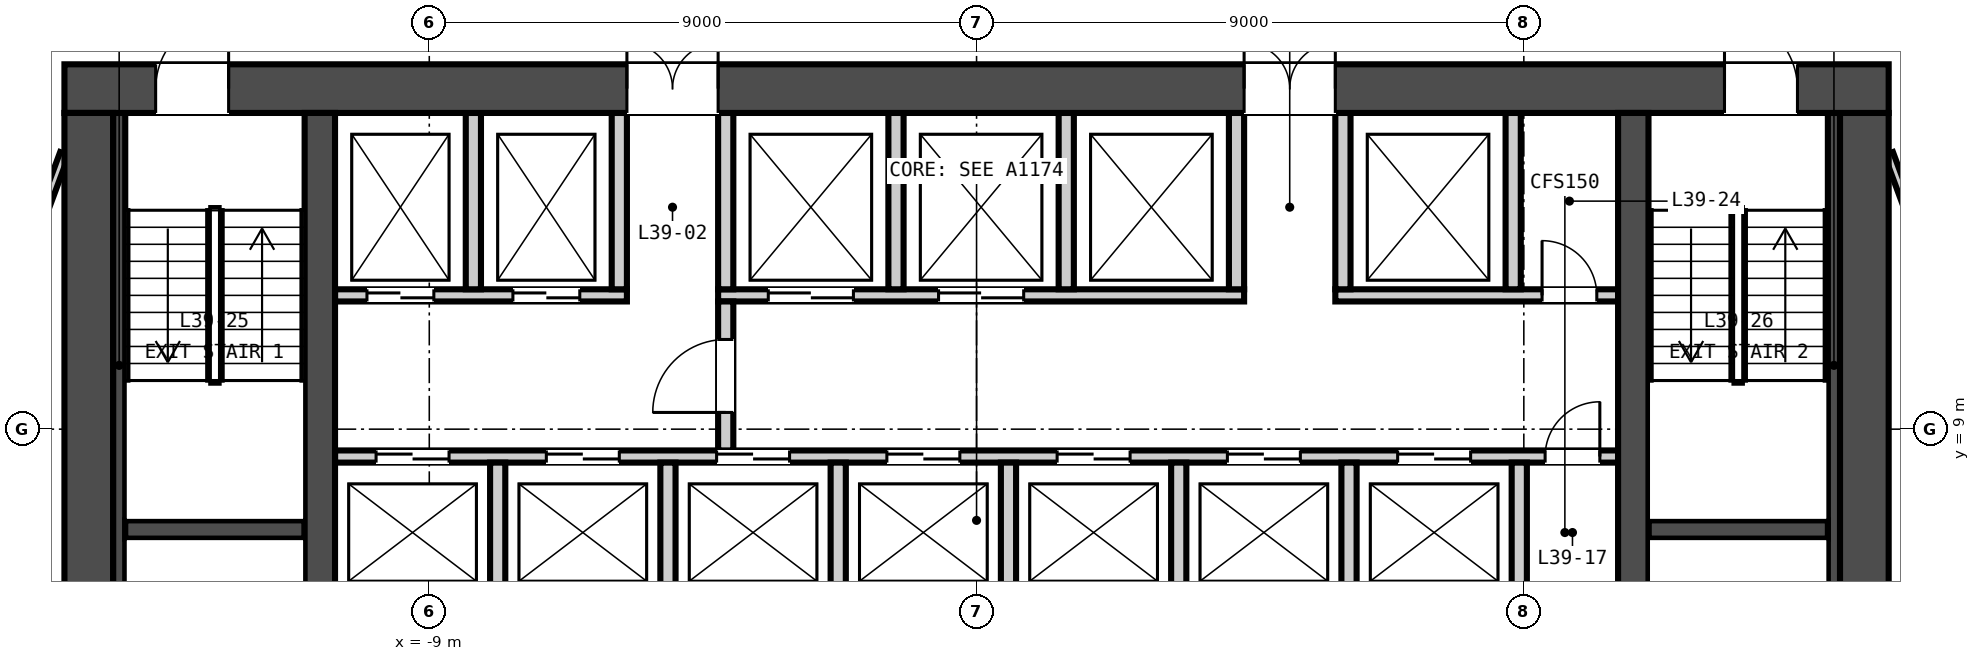
"""IFC4 building model, lengths in metres.
Left out: names, types, materials, properties, quantities, classifications, styles, units other than length and angle.
Written with IfcOpenShell. Run it as: python <this file> out.ifc"""

import sys

from ifc_helpers import new_model, si_unit, direction, frame, frame_2d, origin, place, context, subcontext, project, spatial, rectangle, extrude, element, fill, save


model = new_model("IFC4")
c1 = context("Model", 3, precision=1e-05, world=origin(), true_north=direction((0.0, 1.0)))
c2 = subcontext(c1, "Body", "Model", "MODEL_VIEW")
j1 = project(units=[si_unit("LENGTHUNIT", "METRE"), si_unit("PLANEANGLEUNIT", "RADIAN")], contexts=[c1])
p1 = place(None, origin())
s1 = spatial("IfcSite", under=j1, at=p1, CompositionType="ELEMENT")
p2 = place(p1, origin())
s2 = spatial("IfcBuilding", under=s1, at=p2, CompositionType="ELEMENT")
p3 = place(p2, frame((0.0, 0.0, 159.0)))
s3 = spatial("IfcBuildingStorey", under=s2, at=p3, CompositionType="ELEMENT", Elevation=159.0)
p4 = place(p3, frame((-15.0, 14.6, -0.15), z_axis=(0.0, 0.0, 1.0), x_axis=(1.0, 0.0, 0.0)))
e1 = element("IfcWall", 1, at=p4, inside=s3, PredefinedType="SOLIDWALL", context=c2, shape_type="SweptSolid", body=[
    extrude(rectangle(XDim=30.0, YDim=0.8, at=frame_2d((15.0, 0.0))), origin(), (0.0, 0.0, 1.0), 3.65),
])
p5 = place(p4, frame((9.25, 0.0, 0.15)))
e2 = element("IfcOpeningElement", 2, at=p5, cuts=e1, PredefinedType="OPENING", context=c2, shape_type="SweptSolid", body=[
    extrude(rectangle(XDim=1.5, YDim=2.1, at=frame_2d((0.75, 1.05))), frame((0.0, 0.41, 0.0), z_axis=(0.0, -1.0, 0.0), x_axis=(1.0, 0.0, 0.0)), (0.0, 0.0, 1.0), 0.82),
])
p6 = place(p4, frame((19.4, 0.0, 0.15)))
e3 = element("IfcOpeningElement", 3, at=p6, cuts=e1, PredefinedType="OPENING", context=c2, shape_type="SweptSolid", body=[
    extrude(rectangle(XDim=1.5, YDim=2.1, at=frame_2d((0.75, 1.05))), frame((0.0, 0.41, 0.0), z_axis=(0.0, -1.0, 0.0), x_axis=(1.0, 0.0, 0.0)), (0.0, 0.0, 1.0), 0.82),
])
p7 = place(p4, frame((1.5, 0.0, 0.15)))
e4 = element("IfcOpeningElement", 4, at=p7, cuts=e1, PredefinedType="OPENING", context=c2, shape_type="SweptSolid", body=[
    extrude(rectangle(XDim=1.2, YDim=2.1, at=frame_2d((0.6, 1.05))), frame((0.0, 0.41, 0.0), z_axis=(0.0, -1.0, 0.0), x_axis=(1.0, 0.0, 0.0)), (0.0, 0.0, 1.0), 0.82),
])
p8 = place(p4, frame((27.3, 0.0, 0.15)))
e5 = element("IfcOpeningElement", 5, at=p8, cuts=e1, PredefinedType="OPENING", context=c2, shape_type="SweptSolid", body=[
    extrude(rectangle(XDim=1.2, YDim=2.1, at=frame_2d((0.6, 1.05))), frame((0.0, 0.41, 0.0), z_axis=(0.0, -1.0, 0.0), x_axis=(1.0, 0.0, 0.0)), (0.0, 0.0, 1.0), 0.82),
])
for number, where, z_axis, x_axis in (
    (6, (-14.6, 0.8, -0.15), (0.0, 0.0, 1.0), (0.0, 1.0, 0.0)),
    (7, (14.6, 0.8, -0.15), (0.0, 0.0, 1.0), (0.0, 1.0, 0.0)),
):
    element("IfcWall", number, at=place(p3, frame(where, z_axis=z_axis, x_axis=x_axis)), inside=s3, PredefinedType="SOLIDWALL", context=c2, shape_type="SweptSolid", body=[
        extrude(rectangle(XDim=13.4, YDim=0.8, at=frame_2d((6.7, 0.0))), origin(), (0.0, 0.0, 1.0), 3.65),
    ])
for number, where, z_axis, x_axis in (
    (8, (-10.8, 0.8, -0.15), (0.0, 0.0, 1.0), (0.0, 1.0, 0.0)),
    (9, (10.8, 0.8, -0.15), (0.0, 0.0, 1.0), (0.0, 1.0, 0.0)),
):
    element("IfcWall", number, at=place(p3, frame(where, z_axis=z_axis, x_axis=x_axis)), inside=s3, PredefinedType="SOLIDWALL", context=c2, shape_type="SweptSolid", body=[
        extrude(rectangle(XDim=13.4, YDim=0.5, at=frame_2d((6.7, 0.0))), origin(), (0.0, 0.0, 1.0), 3.65),
    ])
p9 = place(p3, frame((-10.55, 8.55, 0.0), z_axis=(0.0, 0.0, 1.0), x_axis=(1.0, 0.0, 0.0)))
e10 = element("IfcWall", 10, at=p9, inside=s3, PredefinedType="PARTITIONING", context=c2, shape_type="SweptSolid", body=[
    extrude(rectangle(XDim=21.1, YDim=0.2, at=frame_2d((10.55, 0.0))), origin(), (0.0, 0.0, 1.0), 3.5),
])
p10 = place(p9, frame((0.675, 0.0, 0.0)))
e11 = element("IfcOpeningElement", 11, at=p10, cuts=e10, PredefinedType="OPENING", context=c2, shape_type="SweptSolid", body=[
    extrude(rectangle(XDim=1.2, YDim=2.1, at=frame_2d((0.6, 1.05))), frame((0.0, 0.11, 0.0), z_axis=(0.0, -1.0, 0.0), x_axis=(1.0, 0.0, 0.0)), (0.0, 0.0, 1.0), 0.22),
])
p11 = place(p9, frame((3.475, 0.0, 0.0)))
e12 = element("IfcOpeningElement", 12, at=p11, cuts=e10, PredefinedType="OPENING", context=c2, shape_type="SweptSolid", body=[
    extrude(rectangle(XDim=1.2, YDim=2.1, at=frame_2d((0.6, 1.05))), frame((0.0, 0.11, 0.0), z_axis=(0.0, -1.0, 0.0), x_axis=(1.0, 0.0, 0.0)), (0.0, 0.0, 1.0), 0.22),
])
p12 = place(p9, frame((6.275, 0.0, 0.0)))
e13 = element("IfcOpeningElement", 13, at=p12, cuts=e10, PredefinedType="OPENING", context=c2, shape_type="SweptSolid", body=[
    extrude(rectangle(XDim=1.2, YDim=2.1, at=frame_2d((0.6, 1.05))), frame((0.0, 0.11, 0.0), z_axis=(0.0, -1.0, 0.0), x_axis=(1.0, 0.0, 0.0)), (0.0, 0.0, 1.0), 0.22),
])
p13 = place(p9, frame((9.075, 0.0, 0.0)))
e14 = element("IfcOpeningElement", 14, at=p13, cuts=e10, PredefinedType="OPENING", context=c2, shape_type="SweptSolid", body=[
    extrude(rectangle(XDim=1.2, YDim=2.1, at=frame_2d((0.6, 1.05))), frame((0.0, 0.11, 0.0), z_axis=(0.0, -1.0, 0.0), x_axis=(1.0, 0.0, 0.0)), (0.0, 0.0, 1.0), 0.22),
])
p14 = place(p9, frame((11.875, 0.0, 0.0)))
e15 = element("IfcOpeningElement", 15, at=p14, cuts=e10, PredefinedType="OPENING", context=c2, shape_type="SweptSolid", body=[
    extrude(rectangle(XDim=1.2, YDim=2.1, at=frame_2d((0.6, 1.05))), frame((0.0, 0.11, 0.0), z_axis=(0.0, -1.0, 0.0), x_axis=(1.0, 0.0, 0.0)), (0.0, 0.0, 1.0), 0.22),
])
p15 = place(p9, frame((14.675, 0.0, 0.0)))
e16 = element("IfcOpeningElement", 16, at=p15, cuts=e10, PredefinedType="OPENING", context=c2, shape_type="SweptSolid", body=[
    extrude(rectangle(XDim=1.2, YDim=2.1, at=frame_2d((0.6, 1.05))), frame((0.0, 0.11, 0.0), z_axis=(0.0, -1.0, 0.0), x_axis=(1.0, 0.0, 0.0)), (0.0, 0.0, 1.0), 0.22),
])
p16 = place(p9, frame((17.475, 0.0, 0.0)))
e17 = element("IfcOpeningElement", 17, at=p16, cuts=e10, PredefinedType="OPENING", context=c2, shape_type="SweptSolid", body=[
    extrude(rectangle(XDim=1.2, YDim=2.1, at=frame_2d((0.6, 1.05))), frame((0.0, 0.11, 0.0), z_axis=(0.0, -1.0, 0.0), x_axis=(1.0, 0.0, 0.0)), (0.0, 0.0, 1.0), 0.22),
])
p17 = place(p9, frame((19.9, 0.0, 0.0)))
e18 = element("IfcOpeningElement", 18, at=p17, cuts=e10, PredefinedType="OPENING", context=c2, shape_type="SweptSolid", body=[
    extrude(rectangle(XDim=0.9, YDim=2.1, at=frame_2d((0.45, 1.05))), frame((0.0, 0.11, 0.0), z_axis=(0.0, -1.0, 0.0), x_axis=(1.0, 0.0, 0.0)), (0.0, 0.0, 1.0), 0.22),
])
p18 = place(p3, frame((-10.55, 11.2, 0.0), z_axis=(0.0, 0.0, 1.0), x_axis=(1.0, 0.0, 0.0)))
e19 = element("IfcWall", 19, at=p18, inside=s3, PredefinedType="PARTITIONING", context=c2, shape_type="SweptSolid", body=[
    extrude(rectangle(XDim=4.8, YDim=0.2, at=frame_2d((2.4, 0.0))), origin(), (0.0, 0.0, 1.0), 3.5),
])
p19 = place(p18, frame((0.525, 0.0, 0.0)))
e20 = element("IfcOpeningElement", 20, at=p19, cuts=e19, PredefinedType="OPENING", context=c2, shape_type="SweptSolid", body=[
    extrude(rectangle(XDim=1.1, YDim=2.1, at=frame_2d((0.55, 1.05))), frame((0.0, 0.11, 0.0), z_axis=(0.0, -1.0, 0.0), x_axis=(1.0, 0.0, 0.0)), (0.0, 0.0, 1.0), 0.22),
])
p20 = place(p18, frame((2.925, 0.0, 0.0)))
e21 = element("IfcOpeningElement", 21, at=p20, cuts=e19, PredefinedType="OPENING", context=c2, shape_type="SweptSolid", body=[
    extrude(rectangle(XDim=1.1, YDim=2.1, at=frame_2d((0.55, 1.05))), frame((0.0, 0.11, 0.0), z_axis=(0.0, -1.0, 0.0), x_axis=(1.0, 0.0, 0.0)), (0.0, 0.0, 1.0), 0.22),
])
p21 = place(p3, frame((-4.25, 11.2, 0.0), z_axis=(0.0, 0.0, 1.0), x_axis=(1.0, 0.0, 0.0)))
e22 = element("IfcWall", 22, at=p21, inside=s3, PredefinedType="PARTITIONING", context=c2, shape_type="SweptSolid", body=[
    extrude(rectangle(XDim=8.65, YDim=0.2, at=frame_2d((4.325, 0.0))), origin(), (0.0, 0.0, 1.0), 3.5),
])
p22 = place(p21, frame((0.825, 0.0, 0.0)))
e23 = element("IfcOpeningElement", 23, at=p22, cuts=e22, PredefinedType="OPENING", context=c2, shape_type="SweptSolid", body=[
    extrude(rectangle(XDim=1.4, YDim=2.1, at=frame_2d((0.7, 1.05))), frame((0.0, 0.11, 0.0), z_axis=(0.0, -1.0, 0.0), x_axis=(1.0, 0.0, 0.0)), (0.0, 0.0, 1.0), 0.22),
])
p23 = place(p21, frame((3.625, 0.0, 0.0)))
e24 = element("IfcOpeningElement", 24, at=p23, cuts=e22, PredefinedType="OPENING", context=c2, shape_type="SweptSolid", body=[
    extrude(rectangle(XDim=1.4, YDim=2.1, at=frame_2d((0.7, 1.05))), frame((0.0, 0.11, 0.0), z_axis=(0.0, -1.0, 0.0), x_axis=(1.0, 0.0, 0.0)), (0.0, 0.0, 1.0), 0.22),
])
p24 = place(p3, frame((5.9, 11.2, 0.0), z_axis=(0.0, 0.0, 1.0), x_axis=(1.0, 0.0, 0.0)))
e25 = element("IfcWall", 25, at=p24, inside=s3, PredefinedType="PARTITIONING", context=c2, shape_type="SweptSolid", body=[
    extrude(rectangle(XDim=4.65, YDim=0.2, at=frame_2d((2.325, 0.0))), origin(), (0.0, 0.0, 1.0), 3.5),
])
p25 = place(p24, frame((3.4, 0.0, 0.0)))
e26 = element("IfcOpeningElement", 26, at=p25, cuts=e25, PredefinedType="OPENING", context=c2, shape_type="SweptSolid", body=[
    extrude(rectangle(XDim=0.9, YDim=2.1, at=frame_2d((0.45, 1.05))), frame((0.0, 0.11, 0.0), z_axis=(0.0, -1.0, 0.0), x_axis=(1.0, 0.0, 0.0)), (0.0, 0.0, 1.0), 0.22),
])
p26 = place(p3, frame((-4.125, 8.65, 0.0), z_axis=(0.0, 0.0, 1.0), x_axis=(0.0, 1.0, 0.0)))
e27 = element("IfcWall", 27, at=p26, inside=s3, PredefinedType="PARTITIONING", context=c2, shape_type="SweptSolid", body=[
    extrude(rectangle(XDim=2.45, YDim=0.25, at=frame_2d((1.225, 0.0))), origin(), (0.0, 0.0, 1.0), 3.5),
])
p27 = place(p26, frame((0.625, 0.0, 0.0)))
e28 = element("IfcOpeningElement", 28, at=p27, cuts=e27, PredefinedType="OPENING", context=c2, shape_type="SweptSolid", body=[
    extrude(rectangle(XDim=1.2, YDim=2.1, at=frame_2d((0.6, 1.05))), frame((0.0, 0.135, 0.0), z_axis=(0.0, -1.0, 0.0), x_axis=(1.0, 0.0, 0.0)), (0.0, 0.0, 1.0), 0.27),
])
for number, where, z_axis, x_axis in (
    (29, (-7.875, 6.15, 0.0), (0.0, 0.0, 1.0), (0.0, 1.0, 0.0)),
    (30, (-5.075, 6.15, 0.0), (0.0, 0.0, 1.0), (0.0, 1.0, 0.0)),
    (31, (-2.275, 6.15, 0.0), (0.0, 0.0, 1.0), (0.0, 1.0, 0.0)),
    (32, (0.525, 6.15, 0.0), (0.0, 0.0, 1.0), (0.0, 1.0, 0.0)),
    (33, (3.325, 6.15, 0.0), (0.0, 0.0, 1.0), (0.0, 1.0, 0.0)),
    (34, (6.125, 6.15, 0.0), (0.0, 0.0, 1.0), (0.0, 1.0, 0.0)),
    (35, (8.925, 6.15, 0.0), (0.0, 0.0, 1.0), (0.0, 1.0, 0.0)),
):
    element("IfcWall", number, at=place(p3, frame(where, z_axis=z_axis, x_axis=x_axis)), inside=s3, PredefinedType="PARTITIONING", context=c2, shape_type="SweptSolid", body=[
        extrude(rectangle(XDim=2.3, YDim=0.25, at=frame_2d((1.15, 0.0))), origin(), (0.0, 0.0, 1.0), 3.5),
    ])
for number, where, z_axis, x_axis in (
    (36, (-8.275, 11.3, 0.0), (0.0, 0.0, 1.0), (0.0, 1.0, 0.0)),
    (37, (-5.875, 11.3, 0.0), (0.0, 0.0, 1.0), (0.0, 1.0, 0.0)),
    (38, (-4.125, 11.3, 0.0), (0.0, 0.0, 1.0), (0.0, 1.0, 0.0)),
    (39, (-1.325, 11.3, 0.0), (0.0, 0.0, 1.0), (0.0, 1.0, 0.0)),
    (40, (1.475, 11.3, 0.0), (0.0, 0.0, 1.0), (0.0, 1.0, 0.0)),
    (41, (4.275, 11.3, 0.0), (0.0, 0.0, 1.0), (0.0, 1.0, 0.0)),
    (42, (6.025, 11.3, 0.0), (0.0, 0.0, 1.0), (0.0, 1.0, 0.0)),
    (43, (8.825, 11.3, 0.0), (0.0, 0.0, 1.0), (0.0, 1.0, 0.0)),
):
    element("IfcWall", number, at=place(p3, frame(where, z_axis=z_axis, x_axis=x_axis)), inside=s3, PredefinedType="PARTITIONING", context=c2, shape_type="SweptSolid", body=[
        extrude(rectangle(XDim=2.9, YDim=0.25, at=frame_2d((1.45, 0.0))), origin(), (0.0, 0.0, 1.0), 3.5),
    ])
p28 = place(p3, frame((-14.0, 7.35, 0.0), z_axis=(0.0, 0.0, 1.0), x_axis=(1.0, 0.0, 0.0)))
e44 = element("IfcWall", 44, at=p28, inside=s3, PredefinedType="SOLIDWALL", context=c2, shape_type="SweptSolid", body=[
    extrude(rectangle(XDim=2.95, YDim=0.3, at=frame_2d((1.475, 0.0))), origin(), (0.0, 0.0, 1.0), 3.5),
])
p29 = place(p3, frame((-14.1, 0.8, 0.0), z_axis=(0.0, 0.0, 1.0), x_axis=(0.0, 1.0, 0.0)))
e45 = element("IfcWall", 45, at=p29, inside=s3, PredefinedType="SOLIDWALL", context=c2, shape_type="SweptSolid", body=[
    extrude(rectangle(XDim=13.4, YDim=0.2, at=frame_2d((6.7, 0.0))), origin(), (0.0, 0.0, 1.0), 3.5),
])
p30 = place(p3, frame((11.05, 7.35, 0.0), z_axis=(0.0, 0.0, 1.0), x_axis=(1.0, 0.0, 0.0)))
e46 = element("IfcWall", 46, at=p30, inside=s3, PredefinedType="SOLIDWALL", context=c2, shape_type="SweptSolid", body=[
    extrude(rectangle(XDim=2.95, YDim=0.3, at=frame_2d((1.475, 0.0))), origin(), (0.0, 0.0, 1.0), 3.5),
])
p31 = place(p3, frame((14.1, 0.8, 0.0), z_axis=(0.0, 0.0, 1.0), x_axis=(0.0, 1.0, 0.0)))
e47 = element("IfcWall", 47, at=p31, inside=s3, PredefinedType="SOLIDWALL", context=c2, shape_type="SweptSolid", body=[
    extrude(rectangle(XDim=13.4, YDim=0.2, at=frame_2d((6.7, 0.0))), origin(), (0.0, 0.0, 1.0), 3.5),
])
p32 = place(p3, frame((-15.0, 13.531, 0.0), z_axis=(0.0, 0.0, 1.0), x_axis=(-0.347347751601, -0.937736391241, 0.0)))
e48 = element("IfcWall", 48, at=p32, inside=s3, PredefinedType="PARTITIONING", context=c2, shape_type="SweptSolid", body=[
    extrude(rectangle(XDim=9.524, YDim=0.15, at=frame_2d((4.762, 0.0))), origin(), (0.0, 0.0, 1.0), 2.741),
])
p33 = place(p32, frame((4.262, 0.0, 0.0)))
e49 = element("IfcOpeningElement", 49, at=p33, cuts=e48, PredefinedType="OPENING", context=c2, shape_type="SweptSolid", body=[
    extrude(rectangle(XDim=1.0, YDim=2.1, at=frame_2d((0.5, 1.05))), frame((0.0, 0.085, 0.0), z_axis=(0.0, -1.0, 0.0), x_axis=(1.0, 0.0, 0.0)), (0.0, 0.0, 1.0), 0.17),
])
p34 = place(p3, frame((18.308, 4.6, 0.0), z_axis=(0.0, 0.0, 1.0), x_axis=(-0.347347751601, 0.937736391241, 0.0)))
e50 = element("IfcWall", 50, at=p34, inside=s3, PredefinedType="PARTITIONING", context=c2, shape_type="SweptSolid", body=[
    extrude(rectangle(XDim=9.524, YDim=0.15, at=frame_2d((4.762, 0.0))), origin(), (0.0, 0.0, 1.0), 2.741),
])
p35 = place(p34, frame((4.262, 0.0, 0.0)))
e51 = element("IfcOpeningElement", 51, at=p35, cuts=e50, PredefinedType="OPENING", context=c2, shape_type="SweptSolid", body=[
    extrude(rectangle(XDim=1.0, YDim=2.1, at=frame_2d((0.5, 1.05))), frame((0.0, 0.085, 0.0), z_axis=(0.0, -1.0, 0.0), x_axis=(1.0, 0.0, 0.0)), (0.0, 0.0, 1.0), 0.17),
])
p36 = place(p27, origin())
e52 = element("IfcDoor", 52, at=p36, inside=s3, OperationType="SINGLE_SWING_LEFT", PredefinedType="DOOR", context=c2, shape_type="SweptSolid", body=[
    extrude(rectangle(XDim=1.2, YDim=2.1, at=frame_2d((0.6, 1.05))), frame((0.0, 0.025, 0.0), z_axis=(0.0, -1.0, 0.0), x_axis=(1.0, 0.0, 0.0)), (0.0, 0.0, 1.0), 0.05),
])
fill(e28, e52)
p37 = place(p10, origin())
e53 = element("IfcDoor", 53, at=p37, inside=s3, OperationType="DOUBLE_DOOR_SLIDING", PredefinedType="DOOR", context=c2, shape_type="SweptSolid", body=[
    extrude(rectangle(XDim=1.2, YDim=2.1, at=frame_2d((0.6, 1.05))), frame((0.0, 0.025, 0.0), z_axis=(0.0, -1.0, 0.0), x_axis=(1.0, 0.0, 0.0)), (0.0, 0.0, 1.0), 0.05),
])
fill(e11, e53)
p38 = place(p11, origin())
e54 = element("IfcDoor", 54, at=p38, inside=s3, OperationType="DOUBLE_DOOR_SLIDING", PredefinedType="DOOR", context=c2, shape_type="SweptSolid", body=[
    extrude(rectangle(XDim=1.2, YDim=2.1, at=frame_2d((0.6, 1.05))), frame((0.0, 0.025, 0.0), z_axis=(0.0, -1.0, 0.0), x_axis=(1.0, 0.0, 0.0)), (0.0, 0.0, 1.0), 0.05),
])
fill(e12, e54)
p39 = place(p12, origin())
e55 = element("IfcDoor", 55, at=p39, inside=s3, OperationType="DOUBLE_DOOR_SLIDING", PredefinedType="DOOR", context=c2, shape_type="SweptSolid", body=[
    extrude(rectangle(XDim=1.2, YDim=2.1, at=frame_2d((0.6, 1.05))), frame((0.0, 0.025, 0.0), z_axis=(0.0, -1.0, 0.0), x_axis=(1.0, 0.0, 0.0)), (0.0, 0.0, 1.0), 0.05),
])
fill(e13, e55)
p40 = place(p13, origin())
e56 = element("IfcDoor", 56, at=p40, inside=s3, OperationType="DOUBLE_DOOR_SLIDING", PredefinedType="DOOR", context=c2, shape_type="SweptSolid", body=[
    extrude(rectangle(XDim=1.2, YDim=2.1, at=frame_2d((0.6, 1.05))), frame((0.0, 0.025, 0.0), z_axis=(0.0, -1.0, 0.0), x_axis=(1.0, 0.0, 0.0)), (0.0, 0.0, 1.0), 0.05),
])
fill(e14, e56)
p41 = place(p14, origin())
e57 = element("IfcDoor", 57, at=p41, inside=s3, OperationType="DOUBLE_DOOR_SLIDING", PredefinedType="DOOR", context=c2, shape_type="SweptSolid", body=[
    extrude(rectangle(XDim=1.2, YDim=2.1, at=frame_2d((0.6, 1.05))), frame((0.0, 0.025, 0.0), z_axis=(0.0, -1.0, 0.0), x_axis=(1.0, 0.0, 0.0)), (0.0, 0.0, 1.0), 0.05),
])
fill(e15, e57)
p42 = place(p15, origin())
e58 = element("IfcDoor", 58, at=p42, inside=s3, OperationType="DOUBLE_DOOR_SLIDING", PredefinedType="DOOR", context=c2, shape_type="SweptSolid", body=[
    extrude(rectangle(XDim=1.2, YDim=2.1, at=frame_2d((0.6, 1.05))), frame((0.0, 0.025, 0.0), z_axis=(0.0, -1.0, 0.0), x_axis=(1.0, 0.0, 0.0)), (0.0, 0.0, 1.0), 0.05),
])
fill(e16, e58)
p43 = place(p16, origin())
e59 = element("IfcDoor", 59, at=p43, inside=s3, OperationType="DOUBLE_DOOR_SLIDING", PredefinedType="DOOR", context=c2, shape_type="SweptSolid", body=[
    extrude(rectangle(XDim=1.2, YDim=2.1, at=frame_2d((0.6, 1.05))), frame((0.0, 0.025, 0.0), z_axis=(0.0, -1.0, 0.0), x_axis=(1.0, 0.0, 0.0)), (0.0, 0.0, 1.0), 0.05),
])
fill(e17, e59)
p44 = place(p17, origin())
e60 = element("IfcDoor", 60, at=p44, inside=s3, OperationType="SINGLE_SWING_RIGHT", PredefinedType="DOOR", context=c2, shape_type="SweptSolid", body=[
    extrude(rectangle(XDim=0.9, YDim=2.1, at=frame_2d((0.45, 1.05))), frame((0.0, 0.025, 0.0), z_axis=(0.0, -1.0, 0.0), x_axis=(1.0, 0.0, 0.0)), (0.0, 0.0, 1.0), 0.05),
])
fill(e18, e60)
p45 = place(p19, origin())
e61 = element("IfcDoor", 61, at=p45, inside=s3, OperationType="DOUBLE_DOOR_SLIDING", PredefinedType="DOOR", context=c2, shape_type="SweptSolid", body=[
    extrude(rectangle(XDim=1.1, YDim=2.1, at=frame_2d((0.55, 1.05))), frame((0.0, 0.025, 0.0), z_axis=(0.0, -1.0, 0.0), x_axis=(1.0, 0.0, 0.0)), (0.0, 0.0, 1.0), 0.05),
])
fill(e20, e61)
p46 = place(p20, origin())
e62 = element("IfcDoor", 62, at=p46, inside=s3, OperationType="DOUBLE_DOOR_SLIDING", PredefinedType="DOOR", context=c2, shape_type="SweptSolid", body=[
    extrude(rectangle(XDim=1.1, YDim=2.1, at=frame_2d((0.55, 1.05))), frame((0.0, 0.025, 0.0), z_axis=(0.0, -1.0, 0.0), x_axis=(1.0, 0.0, 0.0)), (0.0, 0.0, 1.0), 0.05),
])
fill(e21, e62)
p47 = place(p22, origin())
e63 = element("IfcDoor", 63, at=p47, inside=s3, OperationType="DOUBLE_DOOR_SLIDING", PredefinedType="DOOR", context=c2, shape_type="SweptSolid", body=[
    extrude(rectangle(XDim=1.4, YDim=2.1, at=frame_2d((0.7, 1.05))), frame((0.0, 0.025, 0.0), z_axis=(0.0, -1.0, 0.0), x_axis=(1.0, 0.0, 0.0)), (0.0, 0.0, 1.0), 0.05),
])
fill(e23, e63)
p48 = place(p23, origin())
e64 = element("IfcDoor", 64, at=p48, inside=s3, OperationType="DOUBLE_DOOR_SLIDING", PredefinedType="DOOR", context=c2, shape_type="SweptSolid", body=[
    extrude(rectangle(XDim=1.4, YDim=2.1, at=frame_2d((0.7, 1.05))), frame((0.0, 0.025, 0.0), z_axis=(0.0, -1.0, 0.0), x_axis=(1.0, 0.0, 0.0)), (0.0, 0.0, 1.0), 0.05),
])
fill(e24, e64)
p49 = place(p25, origin())
e65 = element("IfcDoor", 65, at=p49, inside=s3, OperationType="SINGLE_SWING_LEFT", PredefinedType="DOOR", context=c2, shape_type="SweptSolid", body=[
    extrude(rectangle(XDim=0.9, YDim=2.1, at=frame_2d((0.45, 1.05))), frame((0.0, 0.025, 0.0), z_axis=(0.0, -1.0, 0.0), x_axis=(1.0, 0.0, 0.0)), (0.0, 0.0, 1.0), 0.05),
])
fill(e26, e65)
p50 = place(p5, origin())
e66 = element("IfcDoor", 66, at=p50, inside=s3, OperationType="DOUBLE_DOOR_SINGLE_SWING", PredefinedType="DOOR", context=c2, shape_type="SweptSolid", body=[
    extrude(rectangle(XDim=1.5, YDim=2.1, at=frame_2d((0.75, 1.05))), frame((0.0, 0.025, 0.0), z_axis=(0.0, -1.0, 0.0), x_axis=(1.0, 0.0, 0.0)), (0.0, 0.0, 1.0), 0.05),
])
fill(e2, e66)
p51 = place(p6, origin())
e67 = element("IfcDoor", 67, at=p51, inside=s3, OperationType="DOUBLE_DOOR_SINGLE_SWING", PredefinedType="DOOR", context=c2, shape_type="SweptSolid", body=[
    extrude(rectangle(XDim=1.5, YDim=2.1, at=frame_2d((0.75, 1.05))), frame((0.0, 0.025, 0.0), z_axis=(0.0, -1.0, 0.0), x_axis=(1.0, 0.0, 0.0)), (0.0, 0.0, 1.0), 0.05),
])
fill(e3, e67)
p52 = place(p7, origin())
e68 = element("IfcDoor", 68, at=p52, inside=s3, OperationType="SINGLE_SWING_RIGHT", PredefinedType="DOOR", context=c2, shape_type="SweptSolid", body=[
    extrude(rectangle(XDim=1.2, YDim=2.1, at=frame_2d((0.6, 1.05))), frame((0.0, 0.025, 0.0), z_axis=(0.0, -1.0, 0.0), x_axis=(1.0, 0.0, 0.0)), (0.0, 0.0, 1.0), 0.05),
])
fill(e4, e68)
p53 = place(p8, origin())
e69 = element("IfcDoor", 69, at=p53, inside=s3, OperationType="SINGLE_SWING_LEFT", PredefinedType="DOOR", context=c2, shape_type="SweptSolid", body=[
    extrude(rectangle(XDim=1.2, YDim=2.1, at=frame_2d((0.6, 1.05))), frame((0.0, 0.025, 0.0), z_axis=(0.0, -1.0, 0.0), x_axis=(1.0, 0.0, 0.0)), (0.0, 0.0, 1.0), 0.05),
])
fill(e5, e69)
save(model, sys.argv[1])
